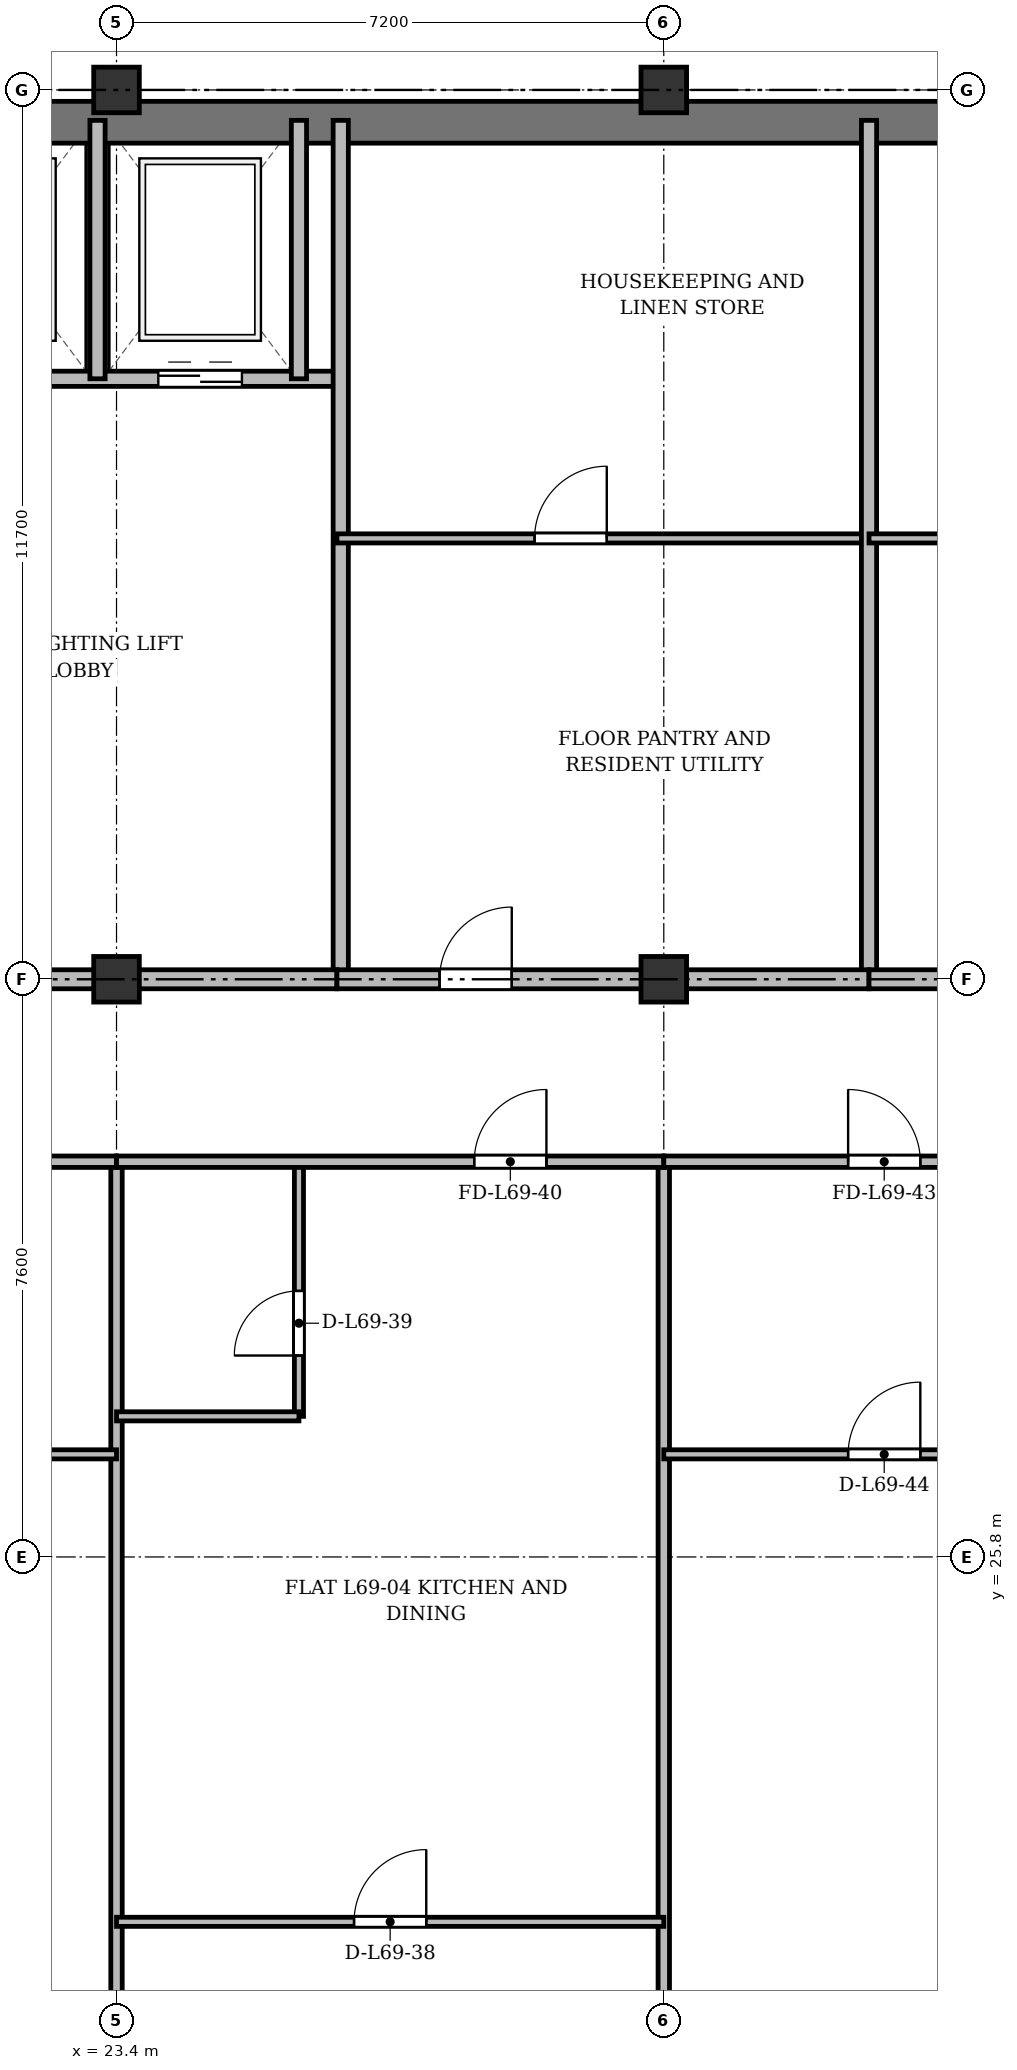
"""IFC4 building model, lengths in metres.
Left out: names, types, materials, properties, quantities, classifications, styles, units other than length and angle.
Written with IfcOpenShell. Run it as: python <this file> out.ifc"""

import sys

from ifc_helpers import new_model, si_unit, direction, frame, frame_2d, origin, origin_2d, place, context, subcontext, project, spatial, rectangle, extrude, source, transform, mapped, element, fill, save


model = new_model("IFC4")
c1 = context("Model", 3, precision=1e-05, world=origin(), true_north=direction((0.0, 1.0)))
c2 = subcontext(c1, "Body", "Model", "MODEL_VIEW")
j1 = project(units=[si_unit("LENGTHUNIT", "METRE"), si_unit("PLANEANGLEUNIT", "RADIAN")], contexts=[c1])
p1 = place(None, origin())
s1 = spatial("IfcSite", under=j1, at=p1, CompositionType="ELEMENT")
p2 = place(p1, origin())
s2 = spatial("IfcBuilding", under=s1, at=p2, CompositionType="ELEMENT")
p3 = place(p2, frame((0.0, 0.0, 266.7)))
s3 = spatial("IfcBuildingStorey", under=s2, at=p3, CompositionType="ELEMENT", Elevation=266.7)
m1 = source(origin(), c2, "Body", "SweptSolid", [
    extrude(rectangle(XDim=0.6, YDim=0.6, at=origin_2d()), origin(), (0.0, 0.0, 1.0), 3.6),
])
for number, where, z_axis, x_axis in (
    (1, (23.4, 33.4, 0.0), (0.0, 0.0, 1.0), (1.0, 0.0, 0.0)),
    (2, (23.4, 45.1, 0.0), (0.0, 0.0, 1.0), (1.0, 0.0, 0.0)),
    (3, (30.6, 33.4, 0.0), (0.0, 0.0, 1.0), (1.0, 0.0, 0.0)),
    (4, (30.6, 45.1, 0.0), (0.0, 0.0, 1.0), (1.0, 0.0, 0.0)),
):
    element("IfcColumn", number, at=place(p3, frame(where, z_axis=z_axis, x_axis=x_axis)), inside=s3, PredefinedType="COLUMN", context=c2, shape_type="MappedRepresentation", body=[
        mapped(m1, transform((0.0, 0.0, 0.0), x_axis=(1.0, 0.0, 0.0), y_axis=(0.0, 1.0, 0.0), z_axis=(0.0, 0.0, 1.0), scale=1.0)),
    ])
p4 = place(p3, frame((15.65, 44.675, 0.0), z_axis=(0.0, 0.0, 1.0), x_axis=(1.0, 0.0, 0.0)))
e5 = element("IfcWall", 5, at=p4, inside=s3, PredefinedType="SHEAR", context=c2, shape_type="SweptSolid", body=[
    extrude(rectangle(XDim=43.1, YDim=0.55, at=frame_2d((21.55, 0.0))), origin(), (0.0, 0.0, 1.0), 3.37),
])
p5 = place(p3, frame((19.55, 41.3, 0.0), z_axis=(0.0, 0.0, 1.0), x_axis=(1.0, 0.0, 0.0)))
e6 = element("IfcWall", 6, at=p5, inside=s3, PredefinedType="SOLIDWALL", context=c2, shape_type="SweptSolid", body=[
    extrude(rectangle(XDim=6.75, YDim=0.2, at=frame_2d((3.375, 0.0))), origin(), (0.0, 0.0, 1.0), 3.37),
])
p6 = place(p5, frame((1.7, 0.0, 0.0)))
e7 = element("IfcOpeningElement", 7, at=p6, cuts=e6, PredefinedType="OPENING", context=c2, shape_type="SweptSolid", body=[
    extrude(rectangle(XDim=1.1, YDim=2.15, at=frame_2d((0.55, 1.075))), frame((0.0, 0.11, 0.0), z_axis=(0.0, -1.0, 0.0), x_axis=(1.0, 0.0, 0.0)), (0.0, 0.0, 1.0), 0.22),
])
p7 = place(p5, frame((4.4, 0.0, 0.0)))
e8 = element("IfcOpeningElement", 8, at=p7, cuts=e6, PredefinedType="OPENING", context=c2, shape_type="SweptSolid", body=[
    extrude(rectangle(XDim=1.1, YDim=2.15, at=frame_2d((0.55, 1.075))), frame((0.0, 0.11, 0.0), z_axis=(0.0, -1.0, 0.0), x_axis=(1.0, 0.0, 0.0)), (0.0, 0.0, 1.0), 0.22),
])
for number, where, z_axis, x_axis in (
    (9, (23.15, 41.3, 0.0), (0.0, 0.0, 1.0), (0.0, 1.0, 0.0)),
    (10, (25.8, 41.3, 0.0), (0.0, 0.0, 1.0), (0.0, 1.0, 0.0)),
):
    element("IfcWall", number, at=place(p3, frame(where, z_axis=z_axis, x_axis=x_axis)), inside=s3, PredefinedType="SOLIDWALL", context=c2, shape_type="SweptSolid", body=[
        extrude(rectangle(XDim=3.4, YDim=0.2, at=frame_2d((1.7, 0.0))), origin(), (0.0, 0.0, 1.0), 3.37),
    ])
p8 = place(p3, frame((26.35, 33.4, 0.0), z_axis=(0.0, 0.0, 1.0), x_axis=(0.0, 1.0, 0.0)))
e11 = element("IfcWall", 11, at=p8, inside=s3, PredefinedType="SOLIDWALL", context=c2, shape_type="SweptSolid", body=[
    extrude(rectangle(XDim=11.3, YDim=0.2, at=frame_2d((5.65, 0.0))), origin(), (0.0, 0.0, 1.0), 2.92),
])
p9 = place(p3, frame((19.5, 33.4, 0.0), z_axis=(0.0, 0.0, 1.0), x_axis=(1.0, 0.0, 0.0)))
e12 = element("IfcWall", 12, at=p9, inside=s3, PredefinedType="PARTITIONING", context=c2, shape_type="SweptSolid", body=[
    extrude(rectangle(XDim=6.8, YDim=0.25, at=frame_2d((3.4, 0.0))), origin(), (0.0, 0.0, 1.0), 2.92),
])
p10 = place(p9, frame((0.75, 0.0, 0.0)))
e13 = element("IfcOpeningElement", 13, at=p10, cuts=e12, PredefinedType="OPENING", context=c2, shape_type="SweptSolid", body=[
    extrude(rectangle(XDim=1.6, YDim=2.2, at=frame_2d((0.8, 1.1))), frame((0.0, 0.135, 0.0), z_axis=(0.0, -1.0, 0.0), x_axis=(1.0, 0.0, 0.0)), (0.0, 0.0, 1.0), 0.27),
])
p11 = place(p3, frame((26.3, 39.2, 0.0), z_axis=(0.0, 0.0, 1.0), x_axis=(1.0, 0.0, 0.0)))
e14 = element("IfcWall", 14, at=p11, inside=s3, PredefinedType="PARTITIONING", context=c2, shape_type="SweptSolid", body=[
    extrude(rectangle(XDim=7.0, YDim=0.12, at=frame_2d((3.5, 0.0))), origin(), (0.0, 0.0, 1.0), 2.87),
])
p12 = place(p11, frame((2.6, 0.0, 0.0)))
e15 = element("IfcOpeningElement", 15, at=p12, cuts=e14, PredefinedType="OPENING", context=c2, shape_type="SweptSolid", body=[
    extrude(rectangle(XDim=0.95, YDim=2.15, at=frame_2d((0.475, 1.075))), frame((0.0, 0.07, 0.0), z_axis=(0.0, -1.0, 0.0), x_axis=(1.0, 0.0, 0.0)), (0.0, 0.0, 1.0), 0.14),
])
p13 = place(p3, frame((33.3, 33.4, 0.0), z_axis=(0.0, 0.0, 1.0), x_axis=(0.0, 1.0, 0.0)))
e16 = element("IfcWall", 16, at=p13, inside=s3, PredefinedType="SOLIDWALL", context=c2, shape_type="SweptSolid", body=[
    extrude(rectangle(XDim=11.3, YDim=0.2, at=frame_2d((5.65, 0.0))), origin(), (0.0, 0.0, 1.0), 2.92),
])
p14 = place(p3, frame((33.3, 39.2, 0.0), z_axis=(0.0, 0.0, 1.0), x_axis=(1.0, 0.0, 0.0)))
e17 = element("IfcWall", 17, at=p14, inside=s3, PredefinedType="PARTITIONING", context=c2, shape_type="SweptSolid", body=[
    extrude(rectangle(XDim=6.8, YDim=0.12, at=frame_2d((3.4, 0.0))), origin(), (0.0, 0.0, 1.0), 3.37),
])
p15 = place(p14, frame((2.6, 0.0, 0.0)))
e18 = element("IfcOpeningElement", 18, at=p15, cuts=e17, PredefinedType="OPENING", context=c2, shape_type="SweptSolid", body=[
    extrude(rectangle(XDim=0.95, YDim=2.15, at=frame_2d((0.475, 1.075))), frame((0.0, 0.07, 0.0), z_axis=(0.0, -1.0, 0.0), x_axis=(1.0, 0.0, 0.0)), (0.0, 0.0, 1.0), 0.14),
])
p16 = place(p3, frame((26.3, 33.4, 0.0), z_axis=(0.0, 0.0, 1.0), x_axis=(1.0, 0.0, 0.0)))
e19 = element("IfcWall", 19, at=p16, inside=s3, PredefinedType="PARTITIONING", context=c2, shape_type="SweptSolid", body=[
    extrude(rectangle(XDim=7.0, YDim=0.25, at=frame_2d((3.5, 0.0))), origin(), (0.0, 0.0, 1.0), 2.92),
])
p17 = place(p16, frame((1.35, 0.0, 0.0)))
e20 = element("IfcOpeningElement", 20, at=p17, cuts=e19, PredefinedType="OPENING", context=c2, shape_type="SweptSolid", body=[
    extrude(rectangle(XDim=0.95, YDim=2.15, at=frame_2d((0.475, 1.075))), frame((0.0, 0.135, 0.0), z_axis=(0.0, -1.0, 0.0), x_axis=(1.0, 0.0, 0.0)), (0.0, 0.0, 1.0), 0.27),
])
p18 = place(p3, frame((33.3, 33.4, 0.0), z_axis=(0.0, 0.0, 1.0), x_axis=(1.0, 0.0, 0.0)))
e21 = element("IfcWall", 21, at=p18, inside=s3, PredefinedType="PARTITIONING", context=c2, shape_type="SweptSolid", body=[
    extrude(rectangle(XDim=6.8, YDim=0.25, at=frame_2d((3.4, 0.0))), origin(), (0.0, 0.0, 1.0), 2.92),
])
p19 = place(p18, frame((2.4, 0.0, 0.0)))
e22 = element("IfcOpeningElement", 22, at=p19, cuts=e21, PredefinedType="OPENING", context=c2, shape_type="SweptSolid", body=[
    extrude(rectangle(XDim=1.0, YDim=2.15, at=frame_2d((0.5, 1.075))), frame((0.0, 0.135, 0.0), z_axis=(0.0, -1.0, 0.0), x_axis=(1.0, 0.0, 0.0)), (0.0, 0.0, 1.0), 0.27),
])
for number, where, z_axis, x_axis in (
    (23, (23.4, 3.725, 0.0), (0.0, 0.0, 1.0), (0.0, 1.0, 0.0)),
    (24, (30.6, 3.725, 0.0), (0.0, 0.0, 1.0), (0.0, 1.0, 0.0)),
):
    element("IfcWall", number, at=place(p3, frame(where, z_axis=z_axis, x_axis=x_axis)), inside=s3, PredefinedType="PARTITIONING", context=c2, shape_type="SweptSolid", body=[
        extrude(rectangle(XDim=27.275, YDim=0.15, at=frame_2d((13.637, 0.0))), origin(), (0.0, 0.0, 1.0), 2.87),
    ])
p20 = place(p3, frame((19.2, 31.0, 0.0), z_axis=(0.0, 0.0, 1.0), x_axis=(1.0, 0.0, 0.0)))
e25 = element("IfcWall", 25, at=p20, inside=s3, PredefinedType="PARTITIONING", context=c2, shape_type="SweptSolid", body=[
    extrude(rectangle(XDim=4.2, YDim=0.15, at=frame_2d((2.1, 0.0))), origin(), (0.0, 0.0, 1.0), 2.87),
])
p21 = place(p20, frame((1.529, 0.0, 0.0)))
e26 = element("IfcOpeningElement", 26, at=p21, cuts=e25, PredefinedType="OPENING", context=c2, shape_type="SweptSolid", body=[
    extrude(rectangle(XDim=0.95, YDim=2.15, at=frame_2d((0.475, 1.075))), frame((0.0, 0.085, 0.0), z_axis=(0.0, -1.0, 0.0), x_axis=(1.0, 0.0, 0.0)), (0.0, 0.0, 1.0), 0.17),
])
p22 = place(p3, frame((19.2, 27.15, 0.0), z_axis=(0.0, 0.0, 1.0), x_axis=(1.0, 0.0, 0.0)))
e27 = element("IfcWall", 27, at=p22, inside=s3, PredefinedType="PARTITIONING", context=c2, shape_type="SweptSolid", body=[
    extrude(rectangle(XDim=4.2, YDim=0.12, at=frame_2d((2.1, 0.0))), origin(), (0.0, 0.0, 1.0), 2.87),
])
p23 = place(p22, frame((1.529, 0.0, 0.0)))
e28 = element("IfcOpeningElement", 28, at=p23, cuts=e27, PredefinedType="OPENING", context=c2, shape_type="SweptSolid", body=[
    extrude(rectangle(XDim=0.95, YDim=2.15, at=frame_2d((0.475, 1.075))), frame((0.0, 0.07, 0.0), z_axis=(0.0, -1.0, 0.0), x_axis=(1.0, 0.0, 0.0)), (0.0, 0.0, 1.0), 0.14),
])
p24 = place(p3, frame((23.4, 21.0, 0.0), z_axis=(0.0, 0.0, 1.0), x_axis=(1.0, 0.0, 0.0)))
e29 = element("IfcWall", 29, at=p24, inside=s3, PredefinedType="PARTITIONING", context=c2, shape_type="SweptSolid", body=[
    extrude(rectangle(XDim=7.2, YDim=0.12, at=frame_2d((3.6, 0.0))), origin(), (0.0, 0.0, 1.0), 2.87),
])
p25 = place(p24, frame((3.125, 0.0, 0.0)))
e30 = element("IfcOpeningElement", 30, at=p25, cuts=e29, PredefinedType="OPENING", context=c2, shape_type="SweptSolid", body=[
    extrude(rectangle(XDim=0.95, YDim=2.15, at=frame_2d((0.475, 1.075))), frame((0.0, 0.07, 0.0), z_axis=(0.0, -1.0, 0.0), x_axis=(1.0, 0.0, 0.0)), (0.0, 0.0, 1.0), 0.14),
])
p26 = place(p3, frame((25.8, 27.65, 0.0), z_axis=(0.0, 0.0, 1.0), x_axis=(0.0, 1.0, 0.0)))
e31 = element("IfcWall", 31, at=p26, inside=s3, PredefinedType="PARTITIONING", context=c2, shape_type="SweptSolid", body=[
    extrude(rectangle(XDim=3.35, YDim=0.12, at=frame_2d((1.675, 0.0))), origin(), (0.0, 0.0, 1.0), 3.37),
])
p27 = place(p26, frame((0.8, 0.0, 0.0)))
e32 = element("IfcOpeningElement", 32, at=p27, cuts=e31, PredefinedType="OPENING", context=c2, shape_type="SweptSolid", body=[
    extrude(rectangle(XDim=0.85, YDim=2.1, at=frame_2d((0.425, 1.05))), frame((0.0, 0.07, 0.0), z_axis=(0.0, -1.0, 0.0), x_axis=(1.0, 0.0, 0.0)), (0.0, 0.0, 1.0), 0.14),
])
p28 = place(p3, frame((23.4, 27.65, 0.0), z_axis=(0.0, 0.0, 1.0), x_axis=(1.0, 0.0, 0.0)))
e33 = element("IfcWall", 33, at=p28, inside=s3, PredefinedType="PARTITIONING", context=c2, shape_type="SweptSolid", body=[
    extrude(rectangle(XDim=2.4, YDim=0.12, at=frame_2d((1.2, 0.0))), origin(), (0.0, 0.0, 1.0), 2.87),
])
p29 = place(p3, frame((23.4, 31.0, 0.0), z_axis=(0.0, 0.0, 1.0), x_axis=(1.0, 0.0, 0.0)))
e34 = element("IfcWall", 34, at=p29, inside=s3, PredefinedType="PARTITIONING", context=c2, shape_type="SweptSolid", body=[
    extrude(rectangle(XDim=7.2, YDim=0.15, at=frame_2d((3.6, 0.0))), origin(), (0.0, 0.0, 1.0), 2.87),
])
p30 = place(p29, frame((4.706, 0.0, 0.0)))
e35 = element("IfcOpeningElement", 35, at=p30, cuts=e34, PredefinedType="OPENING", context=c2, shape_type="SweptSolid", body=[
    extrude(rectangle(XDim=0.95, YDim=2.15, at=frame_2d((0.475, 1.075))), frame((0.0, 0.085, 0.0), z_axis=(0.0, -1.0, 0.0), x_axis=(1.0, 0.0, 0.0)), (0.0, 0.0, 1.0), 0.17),
])
p31 = place(p3, frame((30.6, 31.0, 0.0), z_axis=(0.0, 0.0, 1.0), x_axis=(1.0, 0.0, 0.0)))
e36 = element("IfcWall", 36, at=p31, inside=s3, PredefinedType="PARTITIONING", context=c2, shape_type="SweptSolid", body=[
    extrude(rectangle(XDim=5.8, YDim=0.15, at=frame_2d((2.9, 0.0))), origin(), (0.0, 0.0, 1.0), 2.87),
])
p32 = place(p31, frame((2.425, 0.0, 0.0)))
e37 = element("IfcOpeningElement", 37, at=p32, cuts=e36, PredefinedType="OPENING", context=c2, shape_type="SweptSolid", body=[
    extrude(rectangle(XDim=0.95, YDim=2.15, at=frame_2d((0.475, 1.075))), frame((0.0, 0.085, 0.0), z_axis=(0.0, -1.0, 0.0), x_axis=(1.0, 0.0, 0.0)), (0.0, 0.0, 1.0), 0.17),
])
p33 = place(p3, frame((30.6, 27.15, 0.0), z_axis=(0.0, 0.0, 1.0), x_axis=(1.0, 0.0, 0.0)))
e38 = element("IfcWall", 38, at=p33, inside=s3, PredefinedType="PARTITIONING", context=c2, shape_type="SweptSolid", body=[
    extrude(rectangle(XDim=5.8, YDim=0.12, at=frame_2d((2.9, 0.0))), origin(), (0.0, 0.0, 1.0), 2.87),
])
p34 = place(p33, frame((2.425, 0.0, 0.0)))
e39 = element("IfcOpeningElement", 39, at=p34, cuts=e38, PredefinedType="OPENING", context=c2, shape_type="SweptSolid", body=[
    extrude(rectangle(XDim=0.95, YDim=2.15, at=frame_2d((0.475, 1.075))), frame((0.0, 0.07, 0.0), z_axis=(0.0, -1.0, 0.0), x_axis=(1.0, 0.0, 0.0)), (0.0, 0.0, 1.0), 0.14),
])
m2 = source(origin(), c2, "Body", "SweptSolid", [
    extrude(rectangle(XDim=1.1, YDim=2.15, at=frame_2d((0.55, 1.075))), frame((0.0, 0.025, 0.0), z_axis=(0.0, -1.0, 0.0), x_axis=(1.0, 0.0, 0.0)), (0.0, 0.0, 1.0), 0.05),
])
p35 = place(p7, origin())
e40 = element("IfcDoor", 40, at=p35, inside=s3, OperationType="DOUBLE_DOOR_SLIDING", PredefinedType="DOOR", context=c2, shape_type="MappedRepresentation", body=[
    mapped(m2, transform((0.0, 0.0, 0.0), x_axis=(1.0, 0.0, 0.0), y_axis=(0.0, 1.0, 0.0), z_axis=(0.0, 0.0, 1.0), scale=1.0)),
])
fill(e8, e40)
m3 = source(origin(), c2, "Body", "SweptSolid", [
    extrude(rectangle(XDim=0.95, YDim=2.15, at=frame_2d((0.475, 1.075))), frame((0.0, 0.025, 0.0), z_axis=(0.0, -1.0, 0.0), x_axis=(1.0, 0.0, 0.0)), (0.0, 0.0, 1.0), 0.05),
])
p36 = place(p12, origin())
e41 = element("IfcDoor", 41, at=p36, inside=s3, OperationType="SINGLE_SWING_RIGHT", PredefinedType="DOOR", context=c2, shape_type="MappedRepresentation", body=[
    mapped(m3, transform((0.0, 0.0, 0.0), x_axis=(1.0, 0.0, 0.0), y_axis=(0.0, 1.0, 0.0), z_axis=(0.0, 0.0, 1.0), scale=1.0)),
])
fill(e15, e41)
p37 = place(p17, origin())
e42 = element("IfcDoor", 42, at=p37, inside=s3, OperationType="SINGLE_SWING_RIGHT", PredefinedType="DOOR", context=c2, shape_type="MappedRepresentation", body=[
    mapped(m3, transform((0.0, 0.0, 0.0), x_axis=(1.0, 0.0, 0.0), y_axis=(0.0, 1.0, 0.0), z_axis=(0.0, 0.0, 1.0), scale=1.0)),
])
fill(e20, e42)
p38 = place(p25, origin())
e43 = element("IfcDoor", 43, at=p38, inside=s3, OperationType="SINGLE_SWING_RIGHT", PredefinedType="DOOR", context=c2, shape_type="MappedRepresentation", body=[
    mapped(m3, transform((0.0, 0.0, 0.0), x_axis=(1.0, 0.0, 0.0), y_axis=(0.0, 1.0, 0.0), z_axis=(0.0, 0.0, 1.0), scale=1.0)),
])
fill(e30, e43)
m4 = source(origin(), c2, "Body", "SweptSolid", [
    extrude(rectangle(XDim=0.85, YDim=2.1, at=frame_2d((0.425, 1.05))), frame((0.0, 0.025, 0.0), z_axis=(0.0, -1.0, 0.0), x_axis=(1.0, 0.0, 0.0)), (0.0, 0.0, 1.0), 0.05),
])
p39 = place(p27, origin())
e44 = element("IfcDoor", 44, at=p39, inside=s3, OperationType="SINGLE_SWING_LEFT", PredefinedType="DOOR", context=c2, shape_type="MappedRepresentation", body=[
    mapped(m4, transform((0.0, 0.0, 0.0), x_axis=(1.0, 0.0, 0.0), y_axis=(0.0, 1.0, 0.0), z_axis=(0.0, 0.0, 1.0), scale=1.0)),
])
fill(e32, e44)
p40 = place(p30, origin())
e45 = element("IfcDoor", 45, at=p40, inside=s3, OperationType="SINGLE_SWING_RIGHT", PredefinedType="DOOR", context=c2, shape_type="MappedRepresentation", body=[
    mapped(m3, transform((0.0, 0.0, 0.0), x_axis=(1.0, 0.0, 0.0), y_axis=(0.0, 1.0, 0.0), z_axis=(0.0, 0.0, 1.0), scale=1.0)),
])
fill(e35, e45)
p41 = place(p32, origin())
e46 = element("IfcDoor", 46, at=p41, inside=s3, OperationType="SINGLE_SWING_LEFT", PredefinedType="DOOR", context=c2, shape_type="MappedRepresentation", body=[
    mapped(m3, transform((0.0, 0.0, 0.0), x_axis=(1.0, 0.0, 0.0), y_axis=(0.0, 1.0, 0.0), z_axis=(0.0, 0.0, 1.0), scale=1.0)),
])
fill(e37, e46)
p42 = place(p34, origin())
e47 = element("IfcDoor", 47, at=p42, inside=s3, OperationType="SINGLE_SWING_RIGHT", PredefinedType="DOOR", context=c2, shape_type="MappedRepresentation", body=[
    mapped(m3, transform((0.0, 0.0, 0.0), x_axis=(1.0, 0.0, 0.0), y_axis=(0.0, 1.0, 0.0), z_axis=(0.0, 0.0, 1.0), scale=1.0)),
])
fill(e39, e47)
save(model, sys.argv[1])
